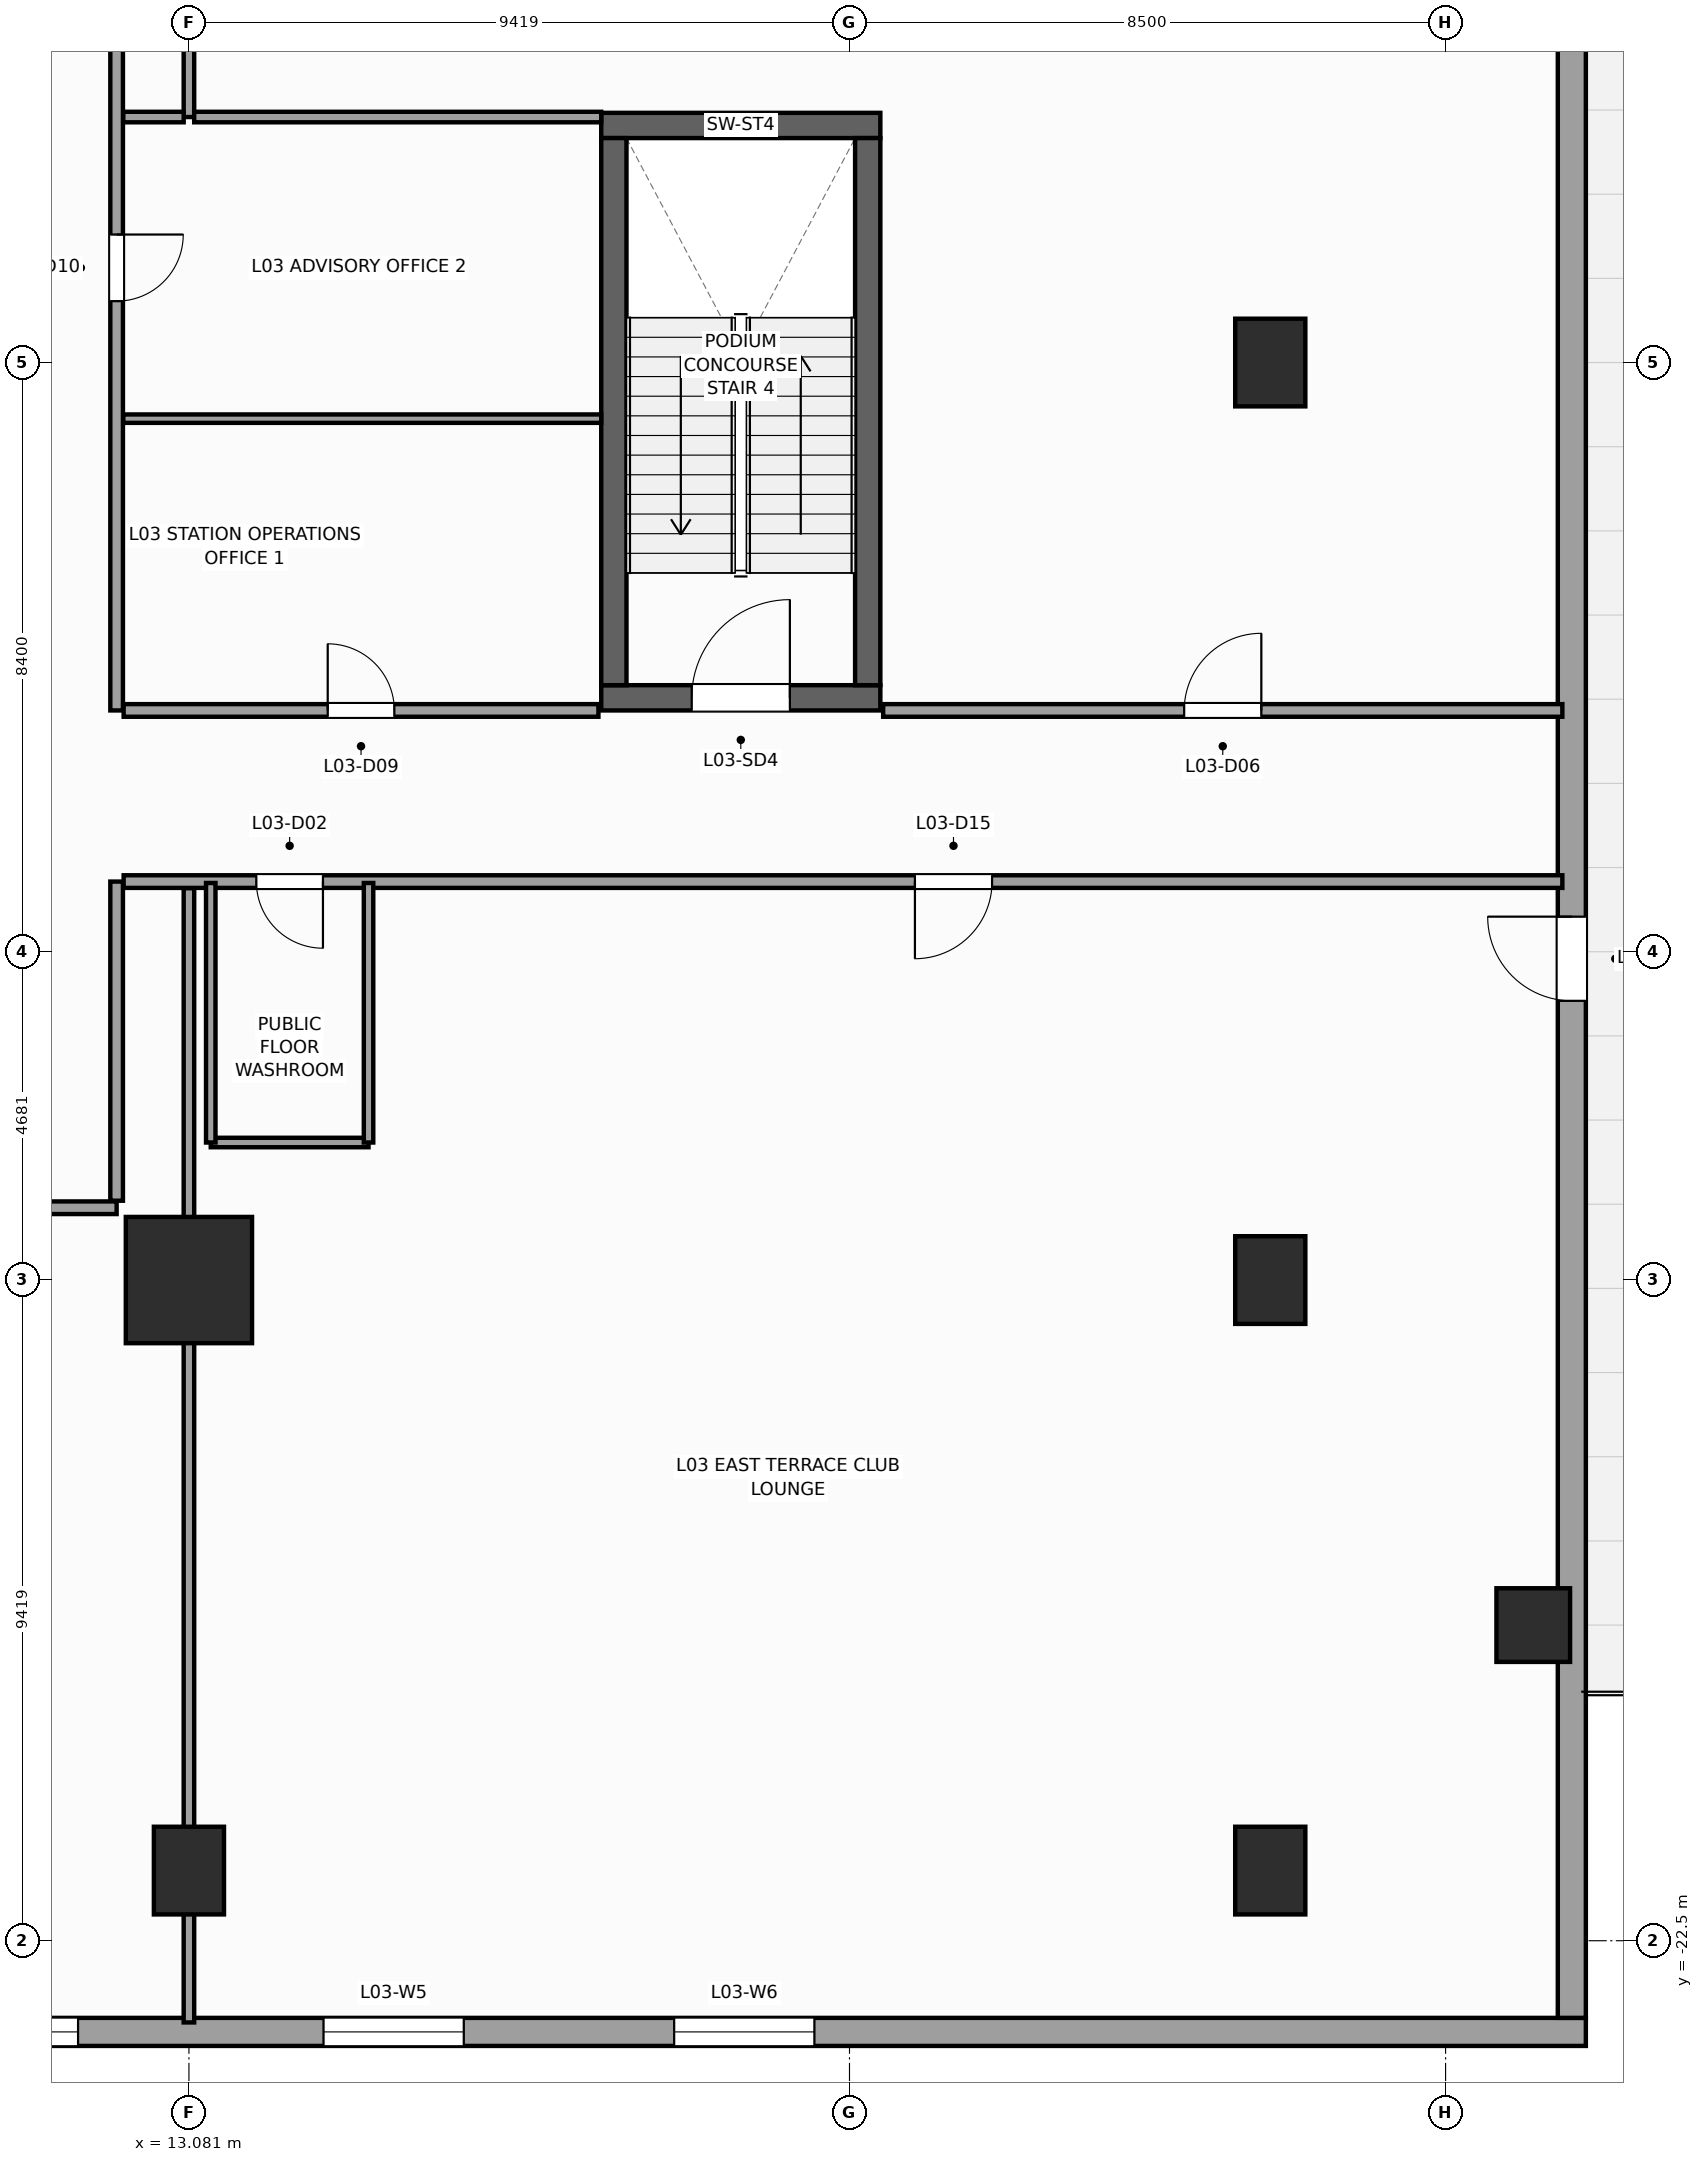
"""IFC4 building model, lengths in metres.
Left out: names, types, materials, properties, quantities, classifications, styles, units other than length and angle.
Written with IfcOpenShell. Run it as: python <this file> out.ifc"""

import sys

from ifc_helpers import new_model, si_unit, direction, frame, frame_2d, origin, origin_2d, place, context, subcontext, project, spatial, rectangle, extrude, source, transform, mapped, element, fill, save


model = new_model("IFC4")
c1 = context("Model", 3, precision=1e-05, world=origin(), true_north=direction((0.0, 1.0)))
c2 = subcontext(c1, "Body", "Model", "MODEL_VIEW")
j1 = project(units=[si_unit("LENGTHUNIT", "METRE"), si_unit("PLANEANGLEUNIT", "RADIAN")], contexts=[c1])
p1 = place(None, origin())
s1 = spatial("IfcSite", under=j1, at=p1, CompositionType="ELEMENT")
p2 = place(p1, origin())
s2 = spatial("IfcBuilding", under=s1, at=p2, CompositionType="ELEMENT")
p3 = place(p2, frame((0.0, 0.0, 16.0)))
s3 = spatial("IfcBuildingStorey", under=s2, at=p3, CompositionType="ELEMENT", Elevation=16.0)
p4 = place(p3, frame((18.96, -4.78, 0.0), z_axis=(0.0, 0.0, 1.0), x_axis=(1.0, 0.0, 0.0)))
e1 = element("IfcWall", 1, at=p4, inside=s3, PredefinedType="SHEAR", context=c2, shape_type="SweptSolid", body=[
    extrude(rectangle(XDim=3.98, YDim=0.36, at=frame_2d((1.99, 0.0))), origin(), (0.0, 0.0, 1.0), 5.0),
])
p5 = place(p4, frame((1.29, 0.0, 0.0)))
e2 = element("IfcOpeningElement", 2, at=p5, cuts=e1, PredefinedType="OPENING", context=c2, shape_type="SweptSolid", body=[
    extrude(rectangle(XDim=1.4, YDim=2.2, at=frame_2d((0.7, 1.1))), frame((0.0, 0.19, 0.0), z_axis=(0.0, -1.0, 0.0), x_axis=(1.0, 0.0, 0.0)), (0.0, 0.0, 1.0), 0.38),
])
p6 = place(p3, frame((18.96, 3.38, 0.0), z_axis=(0.0, 0.0, 1.0), x_axis=(1.0, 0.0, 0.0)))
e3 = element("IfcWall", 3, at=p6, inside=s3, PredefinedType="SHEAR", context=c2, shape_type="SweptSolid", body=[
    extrude(rectangle(XDim=3.98, YDim=0.36, at=frame_2d((1.99, 0.0))), origin(), (0.0, 0.0, 1.0), 5.0),
])
for number, where, z_axis, x_axis in (
    (4, (19.14, -4.6, 0.0), (0.0, 0.0, 1.0), (0.0, 1.0, 0.0)),
    (5, (22.76, -4.6, 0.0), (0.0, 0.0, 1.0), (0.0, 1.0, 0.0)),
):
    element("IfcWall", number, at=place(p3, frame(where, z_axis=z_axis, x_axis=x_axis)), inside=s3, PredefinedType="SHEAR", context=c2, shape_type="SweptSolid", body=[
        extrude(rectangle(XDim=7.8, YDim=0.36, at=frame_2d((3.9, 0.0))), origin(), (0.0, 0.0, 1.0), 5.0),
    ])
m1 = source(origin(), c2, "Body", "SweptSolid", [
    extrude(rectangle(XDim=1.8, YDim=1.8, at=origin_2d()), origin(), (0.0, 0.0, 1.0), 5.0),
])
p7 = place(p3, frame((13.081, -13.081, 0.0), z_axis=(0.0, 0.0, 1.0), x_axis=(1.0, 0.0, 0.0)))
e6 = element("IfcColumn", 6, at=p7, inside=s3, PredefinedType="COLUMN", context=c2, shape_type="MappedRepresentation", body=[
    mapped(m1, transform((0.0, 0.0, 0.0), scale=1.0)),
])
m2 = source(origin(), c2, "Body", "SweptSolid", [
    extrude(rectangle(XDim=1.0, YDim=1.25, at=origin_2d()), origin(), (0.0, 0.0, 1.0), 5.0),
])
for number, where, z_axis, x_axis in (
    (7, (13.081, -21.5, 0.0), (0.0, 0.0, 1.0), (1.0, 0.0, 0.0)),
    (8, (28.5, -21.5, 0.0), (0.0, 0.0, 1.0), (1.0, 0.0, 0.0)),
    (9, (28.5, -13.081, 0.0), (0.0, 0.0, 1.0), (1.0, 0.0, 0.0)),
    (10, (28.5, 0.0, 0.0), (0.0, 0.0, 1.0), (1.0, 0.0, 0.0)),
):
    element("IfcColumn", number, at=place(p3, frame(where, z_axis=z_axis, x_axis=x_axis)), inside=s3, PredefinedType="COLUMN", context=c2, shape_type="MappedRepresentation", body=[
        mapped(m2, transform((0.0, 0.0, 0.0), scale=1.0)),
    ])
m3 = source(origin(), c2, "Body", "SweptSolid", [
    extrude(rectangle(XDim=1.05, YDim=1.05, at=origin_2d()), origin(), (0.0, 0.0, 1.0), 5.0),
])
p8 = place(p3, frame((32.25, -18.0, 0.0), z_axis=(0.0, 0.0, 1.0), x_axis=(1.0, 0.0, 0.0)))
e11 = element("IfcColumn", 11, at=p8, inside=s3, PredefinedType="COLUMN", context=c2, shape_type="MappedRepresentation", body=[
    mapped(m3, transform((0.0, 0.0, 0.0), scale=1.0)),
])
p9 = place(p3, frame((-2.0, -23.8, 0.0), z_axis=(0.0, 0.0, 1.0), x_axis=(1.0, 0.0, 0.0)))
e12 = element("IfcWall", 12, at=p9, inside=s3, PredefinedType="STANDARD", context=c2, shape_type="SweptSolid", body=[
    extrude(rectangle(XDim=35.0, YDim=0.4, at=frame_2d((17.5, 0.0))), origin(), (0.0, 0.0, 1.0), 4.66),
])
p10 = place(p9, frame((11.5, 0.0, 0.85)))
e13 = element("IfcOpeningElement", 13, at=p10, cuts=e12, PredefinedType="OPENING", context=c2, shape_type="SweptSolid", body=[
    extrude(rectangle(XDim=2.0, YDim=2.8, at=frame_2d((1.0, 1.4))), frame((0.0, 0.21, 0.0), z_axis=(0.0, -1.0, 0.0), x_axis=(1.0, 0.0, 0.0)), (0.0, 0.0, 1.0), 0.42),
])
p11 = place(p9, frame((17.0, 0.0, 0.85)))
e14 = element("IfcOpeningElement", 14, at=p11, cuts=e12, PredefinedType="OPENING", context=c2, shape_type="SweptSolid", body=[
    extrude(rectangle(XDim=2.0, YDim=2.8, at=frame_2d((1.0, 1.4))), frame((0.0, 0.21, 0.0), z_axis=(0.0, -1.0, 0.0), x_axis=(1.0, 0.0, 0.0)), (0.0, 0.0, 1.0), 0.42),
])
p12 = place(p9, frame((22.0, 0.0, 0.85)))
e15 = element("IfcOpeningElement", 15, at=p12, cuts=e12, PredefinedType="OPENING", context=c2, shape_type="SweptSolid", body=[
    extrude(rectangle(XDim=2.0, YDim=2.8, at=frame_2d((1.0, 1.4))), frame((0.0, 0.21, 0.0), z_axis=(0.0, -1.0, 0.0), x_axis=(1.0, 0.0, 0.0)), (0.0, 0.0, 1.0), 0.42),
])
p13 = place(p3, frame((32.8, -23.6, 0.0), z_axis=(0.0, 0.0, 1.0), x_axis=(0.0, 1.0, 0.0)))
e16 = element("IfcWall", 16, at=p13, inside=s3, PredefinedType="STANDARD", context=c2, shape_type="SweptSolid", body=[
    extrude(rectangle(XDim=47.2, YDim=0.4, at=frame_2d((23.6, 0.0))), origin(), (0.0, 0.0, 1.0), 4.66),
])
p14 = place(p13, frame((14.5, 0.0, 0.0)))
e17 = element("IfcOpeningElement", 17, at=p14, cuts=e16, PredefinedType="OPENING", context=c2, shape_type="SweptSolid", body=[
    extrude(rectangle(XDim=1.2, YDim=2.3, at=frame_2d((0.6, 1.15))), frame((0.0, 0.21, 0.0), z_axis=(0.0, -1.0, 0.0), x_axis=(1.0, 0.0, 0.0)), (0.0, 0.0, 1.0), 0.42),
])
p15 = place(p3, frame((4.1, -12.05, 0.0), z_axis=(0.0, 0.0, 1.0), x_axis=(1.0, 0.0, 0.0)))
e18 = element("IfcWall", 18, at=p15, inside=s3, PredefinedType="PARTITIONING", context=c2, shape_type="SweptSolid", body=[
    extrude(rectangle(XDim=7.95, YDim=0.18, at=frame_2d((3.975, 0.0))), origin(), (0.0, 0.0, 1.0), 4.66),
])
p16 = place(p3, frame((12.05, -11.95, 0.0), z_axis=(0.0, 0.0, 1.0), x_axis=(0.0, 1.0, 0.0)))
e19 = element("IfcWall", 19, at=p16, inside=s3, PredefinedType="PARTITIONING", context=c2, shape_type="SweptSolid", body=[
    extrude(rectangle(XDim=4.55, YDim=0.18, at=frame_2d((2.275, 0.0))), origin(), (0.0, 0.0, 1.0), 4.66),
])
p17 = place(p3, frame((12.05, -4.96, 0.0), z_axis=(0.0, 0.0, 1.0), x_axis=(0.0, 1.0, 0.0)))
e20 = element("IfcWall", 20, at=p17, inside=s3, PredefinedType="PARTITIONING", context=c2, shape_type="SweptSolid", body=[
    extrude(rectangle(XDim=16.91, YDim=0.18, at=frame_2d((8.455, 0.0))), origin(), (0.0, 0.0, 1.0), 4.66),
])
p18 = place(p17, frame((5.835, 0.0, 0.0)))
e21 = element("IfcOpeningElement", 21, at=p18, cuts=e20, PredefinedType="OPENING", context=c2, shape_type="SweptSolid", body=[
    extrude(rectangle(XDim=0.95, YDim=2.15, at=frame_2d((0.475, 1.075))), frame((0.0, 0.1, 0.0), z_axis=(0.0, -1.0, 0.0), x_axis=(1.0, 0.0, 0.0)), (0.0, 0.0, 1.0), 0.2),
])
p19 = place(p3, frame((12.15, -7.4, 0.0), z_axis=(0.0, 0.0, 1.0), x_axis=(1.0, 0.0, 0.0)))
e22 = element("IfcWall", 22, at=p19, inside=s3, PredefinedType="PARTITIONING", context=c2, shape_type="SweptSolid", body=[
    extrude(rectangle(XDim=20.515, YDim=0.18, at=frame_2d((10.258, 0.0))), origin(), (0.0, 0.0, 1.0), 4.66),
])
p20 = place(p19, frame((1.892, 0.0, 0.0)))
e23 = element("IfcOpeningElement", 23, at=p20, cuts=e22, PredefinedType="OPENING", context=c2, shape_type="SweptSolid", body=[
    extrude(rectangle(XDim=0.95, YDim=2.1, at=frame_2d((0.475, 1.05))), frame((0.0, 0.1, 0.0), z_axis=(0.0, -1.0, 0.0), x_axis=(1.0, 0.0, 0.0)), (0.0, 0.0, 1.0), 0.2),
])
p21 = place(p19, frame((11.283, 0.0, 0.0)))
e24 = element("IfcOpeningElement", 24, at=p21, cuts=e22, PredefinedType="OPENING", context=c2, shape_type="SweptSolid", body=[
    extrude(rectangle(XDim=1.1, YDim=2.2, at=frame_2d((0.55, 1.1))), frame((0.0, 0.1, 0.0), z_axis=(0.0, -1.0, 0.0), x_axis=(1.0, 0.0, 0.0)), (0.0, 0.0, 1.0), 0.2),
])
p22 = place(p3, frame((12.15, -4.96, 0.0), z_axis=(0.0, 0.0, 1.0), x_axis=(1.0, 0.0, 0.0)))
e25 = element("IfcWall", 25, at=p22, inside=s3, PredefinedType="PARTITIONING", context=c2, shape_type="SweptSolid", body=[
    extrude(rectangle(XDim=6.77, YDim=0.18, at=frame_2d((3.385, 0.0))), origin(), (0.0, 0.0, 1.0), 4.66),
])
p23 = place(p22, frame((2.91, 0.0, 0.0)))
e26 = element("IfcOpeningElement", 26, at=p23, cuts=e25, PredefinedType="OPENING", context=c2, shape_type="SweptSolid", body=[
    extrude(rectangle(XDim=0.95, YDim=2.15, at=frame_2d((0.475, 1.075))), frame((0.0, 0.1, 0.0), z_axis=(0.0, -1.0, 0.0), x_axis=(1.0, 0.0, 0.0)), (0.0, 0.0, 1.0), 0.2),
])
p24 = place(p3, frame((22.98, -4.96, 0.0), z_axis=(0.0, 0.0, 1.0), x_axis=(1.0, 0.0, 0.0)))
e27 = element("IfcWall", 27, at=p24, inside=s3, PredefinedType="PARTITIONING", context=c2, shape_type="SweptSolid", body=[
    extrude(rectangle(XDim=9.685, YDim=0.18, at=frame_2d((4.843, 0.0))), origin(), (0.0, 0.0, 1.0), 4.66),
])
p25 = place(p24, frame((4.292, 0.0, 0.0)))
e28 = element("IfcOpeningElement", 28, at=p25, cuts=e27, PredefinedType="OPENING", context=c2, shape_type="SweptSolid", body=[
    extrude(rectangle(XDim=1.1, YDim=2.2, at=frame_2d((0.55, 1.1))), frame((0.0, 0.1, 0.0), z_axis=(0.0, -1.0, 0.0), x_axis=(1.0, 0.0, 0.0)), (0.0, 0.0, 1.0), 0.2),
])
p26 = place(p3, frame((13.081, 3.5, 0.0), z_axis=(0.0, 0.0, 1.0), x_axis=(0.0, 1.0, 0.0)))
e29 = element("IfcWall", 29, at=p26, inside=s3, PredefinedType="PARTITIONING", context=c2, shape_type="SweptSolid", body=[
    extrude(rectangle(XDim=20.165, YDim=0.15, at=frame_2d((10.083, 0.0))), origin(), (0.0, 0.0, 1.0), 3.652),
])
p27 = place(p3, frame((12.145, 3.5, 0.0), z_axis=(0.0, 0.0, 1.0), x_axis=(1.0, 0.0, 0.0)))
e30 = element("IfcWall", 30, at=p27, inside=s3, PredefinedType="PARTITIONING", context=c2, shape_type="SweptSolid", body=[
    extrude(rectangle(XDim=0.861, YDim=0.15, at=frame_2d((0.431, 0.0))), origin(), (0.0, 0.0, 1.0), 4.66),
])
p28 = place(p3, frame((13.156, 3.5, 0.0), z_axis=(0.0, 0.0, 1.0), x_axis=(1.0, 0.0, 0.0)))
e31 = element("IfcWall", 31, at=p28, inside=s3, PredefinedType="PARTITIONING", context=c2, shape_type="SweptSolid", body=[
    extrude(rectangle(XDim=5.804, YDim=0.15, at=frame_2d((2.902, 0.0))), origin(), (0.0, 0.0, 1.0), 4.66),
])
p29 = place(p3, frame((12.145, -0.8, 0.0), z_axis=(0.0, 0.0, 1.0), x_axis=(1.0, 0.0, 0.0)))
e32 = element("IfcWall", 32, at=p29, inside=s3, PredefinedType="PARTITIONING", context=c2, shape_type="SweptSolid", body=[
    extrude(rectangle(XDim=6.815, YDim=0.12, at=frame_2d((3.407, 0.0))), origin(), (0.0, 0.0, 1.0), 4.66),
])
p30 = place(p3, frame((13.081, -23.665, 0.0), z_axis=(0.0, 0.0, 1.0), x_axis=(0.0, 1.0, 0.0)))
e33 = element("IfcWall", 33, at=p30, inside=s3, PredefinedType="PARTITIONING", context=c2, shape_type="SweptSolid", body=[
    extrude(rectangle(XDim=16.17, YDim=0.15, at=frame_2d((8.085, 0.0))), origin(), (0.0, 0.0, 1.0), 3.652),
])
p31 = place(p3, frame((13.392, -11.12, 0.0), z_axis=(0.0, 0.0, 1.0), x_axis=(1.0, 0.0, 0.0)))
e34 = element("IfcWall", 34, at=p31, inside=s3, PredefinedType="PARTITIONING", context=c2, shape_type="SweptSolid", body=[
    extrude(rectangle(XDim=2.25, YDim=0.135, at=frame_2d((1.125, 0.0))), origin(), (0.0, 0.0, 1.0), 4.66),
])
for number, where, z_axis, x_axis in (
    (35, (15.642, -11.12, 0.0), (0.0, 0.0, 1.0), (0.0, 1.0, 0.0)),
    (36, (13.392, -11.12, 0.0), (0.0, 0.0, 1.0), (0.0, 1.0, 0.0)),
):
    element("IfcWall", number, at=place(p3, frame(where, z_axis=z_axis, x_axis=x_axis)), inside=s3, PredefinedType="PARTITIONING", context=c2, shape_type="SweptSolid", body=[
        extrude(rectangle(XDim=3.7, YDim=0.135, at=frame_2d((1.85, 0.0))), origin(), (0.0, 0.0, 1.0), 4.66),
    ])
m4 = source(origin(), c2, "Body", "SweptSolid", [
    extrude(rectangle(XDim=2.0, YDim=2.8, at=frame_2d((1.0, 1.4))), frame((0.0, 0.03, 0.0), z_axis=(0.0, -1.0, 0.0), x_axis=(1.0, 0.0, 0.0)), (0.0, 0.0, 1.0), 0.06),
])
p32 = place(p10, origin())
e37 = element("IfcWindow", 37, at=p32, inside=s3, PartitioningType="SINGLE_PANEL", PredefinedType="WINDOW", context=c2, shape_type="MappedRepresentation", body=[
    mapped(m4, transform((0.0, 0.0, 0.0), scale=1.0)),
])
fill(e13, e37)
p33 = place(p11, origin())
e38 = element("IfcWindow", 38, at=p33, inside=s3, PartitioningType="SINGLE_PANEL", PredefinedType="WINDOW", context=c2, shape_type="MappedRepresentation", body=[
    mapped(m4, transform((0.0, 0.0, 0.0), scale=1.0)),
])
fill(e14, e38)
p34 = place(p12, origin())
e39 = element("IfcWindow", 39, at=p34, inside=s3, PartitioningType="SINGLE_PANEL", PredefinedType="WINDOW", context=c2, shape_type="MappedRepresentation", body=[
    mapped(m4, transform((0.0, 0.0, 0.0), scale=1.0)),
])
fill(e15, e39)
m5 = source(origin(), c2, "Body", "SweptSolid", [
    extrude(rectangle(XDim=1.2, YDim=2.3, at=frame_2d((0.6, 1.15))), frame((0.0, 0.025, 0.0), z_axis=(0.0, -1.0, 0.0), x_axis=(1.0, 0.0, 0.0)), (0.0, 0.0, 1.0), 0.05),
])
p35 = place(p14, origin())
e40 = element("IfcDoor", 40, at=p35, inside=s3, OperationType="SINGLE_SWING_RIGHT", PredefinedType="DOOR", context=c2, shape_type="MappedRepresentation", body=[
    mapped(m5, transform((0.0, 0.0, 0.0), scale=1.0)),
])
fill(e17, e40)
m6 = source(origin(), c2, "Body", "SweptSolid", [
    extrude(rectangle(XDim=1.4, YDim=2.2, at=frame_2d((0.7, 1.1))), frame((0.0, 0.025, 0.0), z_axis=(0.0, -1.0, 0.0), x_axis=(1.0, 0.0, 0.0)), (0.0, 0.0, 1.0), 0.05),
])
p36 = place(p5, origin())
e41 = element("IfcDoor", 41, at=p36, inside=s3, OperationType="SINGLE_SWING_RIGHT", PredefinedType="DOOR", context=c2, shape_type="MappedRepresentation", body=[
    mapped(m6, transform((0.0, 0.0, 0.0), scale=1.0)),
])
fill(e2, e41)
m7 = source(origin(), c2, "Body", "SweptSolid", [
    extrude(rectangle(XDim=0.95, YDim=2.1, at=frame_2d((0.475, 1.05))), frame((0.0, 0.025, 0.0), z_axis=(0.0, -1.0, 0.0), x_axis=(1.0, 0.0, 0.0)), (0.0, 0.0, 1.0), 0.05),
])
p37 = place(p20, frame((0.95, 0.0, 0.0), z_axis=(0.0, 0.0, 1.0), x_axis=(-1.0, 0.0, 0.0)))
e42 = element("IfcDoor", 42, at=p37, inside=s3, OperationType="SINGLE_SWING_RIGHT", PredefinedType="DOOR", context=c2, shape_type="MappedRepresentation", body=[
    mapped(m7, transform((0.0, 0.0, 0.0), scale=1.0)),
])
fill(e23, e42)
m8 = source(origin(), c2, "Body", "SweptSolid", [
    extrude(rectangle(XDim=1.1, YDim=2.2, at=frame_2d((0.55, 1.1))), frame((0.0, 0.025, 0.0), z_axis=(0.0, -1.0, 0.0), x_axis=(1.0, 0.0, 0.0)), (0.0, 0.0, 1.0), 0.05),
])
p38 = place(p25, origin())
e43 = element("IfcDoor", 43, at=p38, inside=s3, OperationType="SINGLE_SWING_RIGHT", PredefinedType="DOOR", context=c2, shape_type="MappedRepresentation", body=[
    mapped(m8, transform((0.0, 0.0, 0.0), scale=1.0)),
])
fill(e28, e43)
m9 = source(origin(), c2, "Body", "SweptSolid", [
    extrude(rectangle(XDim=0.95, YDim=2.15, at=frame_2d((0.475, 1.075))), frame((0.0, 0.025, 0.0), z_axis=(0.0, -1.0, 0.0), x_axis=(1.0, 0.0, 0.0)), (0.0, 0.0, 1.0), 0.05),
])
p39 = place(p23, origin())
e44 = element("IfcDoor", 44, at=p39, inside=s3, OperationType="SINGLE_SWING_LEFT", PredefinedType="DOOR", context=c2, shape_type="MappedRepresentation", body=[
    mapped(m9, transform((0.0, 0.0, 0.0), scale=1.0)),
])
fill(e26, e44)
p40 = place(p18, frame((0.95, 0.0, 0.0), z_axis=(0.0, 0.0, 1.0), x_axis=(-1.0, 0.0, 0.0)))
e45 = element("IfcDoor", 45, at=p40, inside=s3, OperationType="SINGLE_SWING_RIGHT", PredefinedType="DOOR", context=c2, shape_type="MappedRepresentation", body=[
    mapped(m9, transform((0.0, 0.0, 0.0), scale=1.0)),
])
fill(e21, e45)
p41 = place(p21, frame((1.1, 0.0, 0.0), z_axis=(0.0, 0.0, 1.0), x_axis=(-1.0, 0.0, 0.0)))
e46 = element("IfcDoor", 46, at=p41, inside=s3, OperationType="SINGLE_SWING_LEFT", PredefinedType="DOOR", context=c2, shape_type="MappedRepresentation", body=[
    mapped(m8, transform((0.0, 0.0, 0.0), scale=1.0)),
])
fill(e24, e46)
save(model, sys.argv[1])
